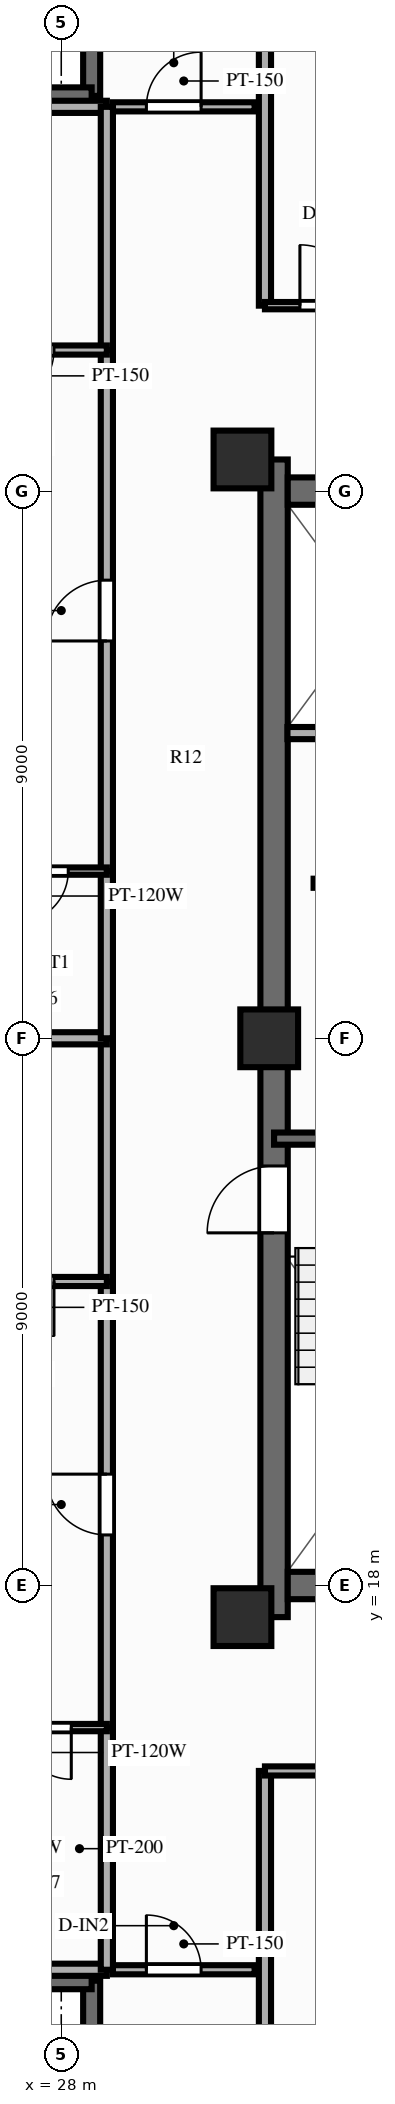
"""IFC4 building model, lengths in metres.
Left out: names, types, materials, properties, quantities, classifications, styles, units other than length and angle.
Written with IfcOpenShell. Run it as: python <this file> out.ifc"""

import sys

from ifc_helpers import new_model, si_unit, direction, frame, frame_2d, origin, origin_2d, place, context, subcontext, project, spatial, rectangle, extrude, source, transform, mapped, element, fill, save


model = new_model("IFC4")
c1 = context("Model", 3, precision=1e-05, world=origin(), true_north=direction((0.0, 1.0)))
c2 = subcontext(c1, "Body", "Model", "MODEL_VIEW")
j1 = project(units=[si_unit("LENGTHUNIT", "METRE"), si_unit("PLANEANGLEUNIT", "RADIAN")], contexts=[c1])
p1 = place(None, origin())
s1 = spatial("IfcSite", under=j1, at=p1, CompositionType="ELEMENT")
p2 = place(p1, origin())
s2 = spatial("IfcBuilding", under=s1, at=p2, CompositionType="ELEMENT")
p3 = place(p2, frame((0.0, 0.0, 240.0)))
s3 = spatial("IfcBuildingStorey", under=s2, at=p3, CompositionType="ELEMENT", Elevation=240.0)
p4 = place(p3, frame((31.5, 17.48, 0.0), z_axis=(0.0, 0.0, 1.0), x_axis=(0.0, 1.0, 0.0)))
e1 = element("IfcWall", 1, at=p4, inside=s3, PredefinedType="SHEAR", context=c2, shape_type="SweptSolid", body=[
    extrude(rectangle(XDim=19.04, YDim=0.45, at=frame_2d((9.52, 0.0))), origin(), (0.0, 0.0, 1.0), 3.0),
])
p5 = place(p4, frame((6.32, 0.0, 0.0)))
e2 = element("IfcOpeningElement", 2, at=p5, cuts=e1, PredefinedType="OPENING", context=c2, shape_type="SweptSolid", body=[
    extrude(rectangle(XDim=1.1, YDim=2.15, at=frame_2d((0.55, 1.075))), frame((0.0, 0.237, 0.0), z_axis=(0.0, -1.0, 0.0), x_axis=(1.0, 0.0, 0.0)), (0.0, 0.0, 1.0), 0.474),
])
p6 = place(p3, frame((31.725, 18.0, 0.0), z_axis=(0.0, 0.0, 1.0), x_axis=(1.0, 0.0, 0.0)))
e3 = element("IfcWall", 3, at=p6, inside=s3, PredefinedType="SHEAR", context=c2, shape_type="SweptSolid", body=[
    extrude(rectangle(XDim=12.55, YDim=0.45, at=frame_2d((6.275, 0.0))), origin(), (0.0, 0.0, 1.0), 3.0),
])
p7 = place(p3, frame((31.725, 36.0, 0.0), z_axis=(0.0, 0.0, 1.0), x_axis=(1.0, 0.0, 0.0)))
e4 = element("IfcWall", 4, at=p7, inside=s3, PredefinedType="SHEAR", context=c2, shape_type="SweptSolid", body=[
    extrude(rectangle(XDim=12.55, YDim=0.45, at=frame_2d((6.275, 0.0))), origin(), (0.0, 0.0, 1.0), 3.0),
])
p8 = place(p7, frame((5.225, 0.0, 0.0), z_axis=(0.0, 0.0, 1.0), x_axis=(-1.0, 0.0, 0.0)))
e5 = element("IfcOpeningElement", 5, at=p8, cuts=e4, PredefinedType="OPENING", context=c2, shape_type="SweptSolid", body=[
    extrude(rectangle(XDim=1.4, YDim=2.15, at=frame_2d((0.7, 1.075))), frame((0.0, 0.237, 0.0), z_axis=(0.0, -1.0, 0.0), x_axis=(1.0, 0.0, 0.0)), (0.0, 0.0, 1.0), 0.474),
])
m1 = source(origin(), c2, "Body", "SweptSolid", [
    extrude(rectangle(XDim=0.95, YDim=0.95, at=origin_2d()), origin(), (0.0, 0.0, 1.0), 3.0),
])
for number, where, z_axis, x_axis in (
    (6, (30.98, 17.48, 0.0), (0.0, 0.0, 1.0), (1.0, 0.0, 0.0)),
    (7, (30.98, 36.52, 0.0), (0.0, 0.0, 1.0), (1.0, 0.0, 0.0)),
    (8, (31.42, 27.0, 0.0), (0.0, 0.0, 1.0), (1.0, 0.0, 0.0)),
):
    element("IfcColumn", number, at=place(p3, frame(where, z_axis=z_axis, x_axis=x_axis)), inside=s3, PredefinedType="COLUMN", context=c2, shape_type="MappedRepresentation", body=[
        mapped(m1, transform((0.0, 0.0, 0.0), scale=1.0)),
    ])
for number, where, z_axis, x_axis in (
    (9, (28.5, 6.08, 0.0), (0.0, 0.0, 1.0), (0.0, 1.0, 0.0)),
    (10, (23.08, 11.5, 0.0), (0.0, 0.0, 1.0), (1.0, 0.0, 0.0)),
    (11, (28.5, 42.5, 0.0), (0.0, 0.0, 1.0), (0.0, 1.0, 0.0)),
    (12, (23.08, 42.5, 0.0), (0.0, 0.0, 1.0), (1.0, 0.0, 0.0)),
):
    element("IfcWall", number, at=place(p3, frame(where, z_axis=z_axis, x_axis=x_axis)), inside=s3, PredefinedType="SOLIDWALL", context=c2, shape_type="SweptSolid", body=[
        extrude(rectangle(XDim=5.42, YDim=0.28, at=frame_2d((2.71, 0.0))), origin(), (0.0, 0.0, 1.0), 2.28),
    ])
p9 = place(p3, frame((32.15, 29.55, 0.0), z_axis=(0.0, 0.0, 1.0), x_axis=(1.0, 0.0, 0.0)))
e13 = element("IfcWall", 13, at=p9, inside=s3, PredefinedType="PARTITIONING", context=c2, shape_type="SweptSolid", body=[
    extrude(rectangle(XDim=2.27, YDim=0.15, at=frame_2d((1.135, 0.0))), origin(), (0.0, 0.0, 1.0), 2.79),
])
p10 = place(p3, frame((31.5, 25.35, 0.0), z_axis=(0.0, 0.0, 1.0), x_axis=(1.0, 0.0, 0.0)))
e14 = element("IfcWall", 14, at=p10, inside=s3, PredefinedType="SOLIDWALL", context=c2, shape_type="SweptSolid", body=[
    extrude(rectangle(XDim=3.93, YDim=0.2, at=frame_2d((1.965, 0.0))), origin(), (0.0, 0.0, 1.0), 2.79),
])
p11 = place(p3, frame((31.72, 32.02, 0.0), z_axis=(0.0, 0.0, 1.0), x_axis=(1.0, 0.0, 0.0)))
e15 = element("IfcWall", 15, at=p11, inside=s3, PredefinedType="PARTITIONING", context=c2, shape_type="SweptSolid", body=[
    extrude(rectangle(XDim=2.8, YDim=0.2, at=frame_2d((1.4, 0.0))), origin(), (0.0, 0.0, 1.0), 2.79),
])
p12 = place(p3, frame((28.85, 11.68, 0.0), z_axis=(0.0, 0.0, 1.0), x_axis=(1.0, 0.0, 0.0)))
e16 = element("IfcWall", 16, at=p12, inside=s3, PredefinedType="PARTITIONING", context=c2, shape_type="SweptSolid", body=[
    extrude(rectangle(XDim=2.33, YDim=0.15, at=frame_2d((1.165, 0.0))), origin(), (0.0, 0.0, 1.0), 2.79),
])
p13 = place(p12, frame((0.55, 0.0, 0.0)))
e17 = element("IfcOpeningElement", 17, at=p13, cuts=e16, PredefinedType="OPENING", context=c2, shape_type="SweptSolid", body=[
    extrude(rectangle(XDim=0.9, YDim=2.1, at=frame_2d((0.45, 1.05))), frame((0.0, 0.087, 0.0), z_axis=(0.0, -1.0, 0.0), x_axis=(1.0, 0.0, 0.0)), (0.0, 0.0, 1.0), 0.174),
])
p14 = place(p3, frame((28.85, 42.32, 0.0), z_axis=(0.0, 0.0, 1.0), x_axis=(1.0, 0.0, 0.0)))
e18 = element("IfcWall", 18, at=p14, inside=s3, PredefinedType="PARTITIONING", context=c2, shape_type="SweptSolid", body=[
    extrude(rectangle(XDim=2.33, YDim=0.15, at=frame_2d((1.165, 0.0))), origin(), (0.0, 0.0, 1.0), 2.79),
])
p15 = place(p14, frame((0.55, 0.0, 0.0)))
e19 = element("IfcOpeningElement", 19, at=p15, cuts=e18, PredefinedType="OPENING", context=c2, shape_type="SweptSolid", body=[
    extrude(rectangle(XDim=0.9, YDim=2.1, at=frame_2d((0.45, 1.05))), frame((0.0, 0.087, 0.0), z_axis=(0.0, -1.0, 0.0), x_axis=(1.0, 0.0, 0.0)), (0.0, 0.0, 1.0), 0.174),
])
p16 = place(p3, frame((31.35, 14.95, 0.0), z_axis=(0.0, 0.0, 1.0), x_axis=(0.0, -1.0, 0.0)))
e20 = element("IfcWall", 20, at=p16, inside=s3, PredefinedType="PARTITIONING", context=c2, shape_type="SweptSolid", body=[
    extrude(rectangle(XDim=8.8, YDim=0.2, at=frame_2d((4.4, 0.0))), origin(), (0.0, 0.0, 1.0), 2.39),
])
p17 = place(p3, frame((31.35, 14.95, 0.0), z_axis=(0.0, 0.0, 1.0), x_axis=(1.0, 0.0, 0.0)))
e21 = element("IfcWall", 21, at=p17, inside=s3, PredefinedType="PARTITIONING", context=c2, shape_type="SweptSolid", body=[
    extrude(rectangle(XDim=6.65, YDim=0.15, at=frame_2d((3.325, 0.0))), origin(), (0.0, 0.0, 1.0), 2.79),
])
p18 = place(p17, frame((2.775, 0.0, 0.0)))
e22 = element("IfcOpeningElement", 22, at=p18, cuts=e21, PredefinedType="OPENING", context=c2, shape_type="SweptSolid", body=[
    extrude(rectangle(XDim=1.1, YDim=2.15, at=frame_2d((0.55, 1.075))), frame((0.0, 0.087, 0.0), z_axis=(0.0, -1.0, 0.0), x_axis=(1.0, 0.0, 0.0)), (0.0, 0.0, 1.0), 0.174),
])
p19 = place(p3, frame((31.35, 39.05, 0.0), z_axis=(0.0, 0.0, 1.0), x_axis=(0.0, 1.0, 0.0)))
e23 = element("IfcWall", 23, at=p19, inside=s3, PredefinedType="PARTITIONING", context=c2, shape_type="SweptSolid", body=[
    extrude(rectangle(XDim=8.8, YDim=0.2, at=frame_2d((4.4, 0.0))), origin(), (0.0, 0.0, 1.0), 2.39),
])
p20 = place(p3, frame((31.35, 39.05, 0.0), z_axis=(0.0, 0.0, 1.0), x_axis=(1.0, 0.0, 0.0)))
e24 = element("IfcWall", 24, at=p20, inside=s3, PredefinedType="PARTITIONING", context=c2, shape_type="SweptSolid", body=[
    extrude(rectangle(XDim=2.15, YDim=0.12, at=frame_2d((1.075, 0.0))), origin(), (0.0, 0.0, 1.0), 2.79),
])
p21 = place(p20, frame((0.575, 0.0, 0.0)))
e25 = element("IfcOpeningElement", 25, at=p21, cuts=e24, PredefinedType="OPENING", context=c2, shape_type="SweptSolid", body=[
    extrude(rectangle(XDim=1.0, YDim=2.1, at=frame_2d((0.5, 1.05))), frame((0.0, 0.072, 0.0), z_axis=(0.0, -1.0, 0.0), x_axis=(1.0, 0.0, 0.0)), (0.0, 0.0, 1.0), 0.144),
])
for number, where, z_axis, x_axis in (
    (26, (28.75, 11.68, 0.0), (0.0, 0.0, 1.0), (-1.0, 0.0, 0.0)),
    (27, (28.75, 42.32, 0.0), (0.0, 0.0, 1.0), (-1.0, 0.0, 0.0)),
):
    element("IfcWall", number, at=place(p3, frame(where, z_axis=z_axis, x_axis=x_axis)), inside=s3, PredefinedType="PARTITIONING", context=c2, shape_type="SweptSolid", body=[
        extrude(rectangle(XDim=5.6, YDim=0.2, at=frame_2d((2.8, 0.0))), origin(), (0.0, 0.0, 1.0), 2.79),
    ])
p22 = place(p3, frame((28.75, 11.68, 0.0), z_axis=(0.0, 0.0, 1.0), x_axis=(0.0, 1.0, 0.0)))
e28 = element("IfcWall", 28, at=p22, inside=s3, PredefinedType="PARTITIONING", context=c2, shape_type="SweptSolid", body=[
    extrude(rectangle(XDim=3.983, YDim=0.2, at=frame_2d((1.992, 0.0))), origin(), (0.0, 0.0, 1.0), 2.79),
])
p23 = place(p3, frame((28.75, 15.663, 0.0), z_axis=(0.0, 0.0, 1.0), x_axis=(0.0, 1.0, 0.0)))
e29 = element("IfcWall", 29, at=p23, inside=s3, PredefinedType="PARTITIONING", context=c2, shape_type="SweptSolid", body=[
    extrude(rectangle(XDim=7.337, YDim=0.2, at=frame_2d((3.668, 0.0))), origin(), (0.0, 0.0, 1.0), 2.79),
])
p24 = place(p23, frame((3.168, 0.0, 0.0)))
e30 = element("IfcOpeningElement", 30, at=p24, cuts=e29, PredefinedType="OPENING", context=c2, shape_type="SweptSolid", body=[
    extrude(rectangle(XDim=1.0, YDim=2.15, at=frame_2d((0.5, 1.075))), frame((0.0, 0.112, 0.0), z_axis=(0.0, -1.0, 0.0), x_axis=(1.0, 0.0, 0.0)), (0.0, 0.0, 1.0), 0.224),
])
p25 = place(p3, frame((28.75, 23.0, 0.0), z_axis=(0.0, 0.0, 1.0), x_axis=(0.0, 1.0, 0.0)))
e31 = element("IfcWall", 31, at=p25, inside=s3, PredefinedType="PARTITIONING", context=c2, shape_type="SweptSolid", body=[
    extrude(rectangle(XDim=4.0, YDim=0.2, at=frame_2d((2.0, 0.0))), origin(), (0.0, 0.0, 1.0), 2.79),
])
p26 = place(p3, frame((28.75, 15.663, 0.0), z_axis=(0.0, 0.0, 1.0), x_axis=(-1.0, 0.0, 0.0)))
e32 = element("IfcWall", 32, at=p26, inside=s3, PredefinedType="PARTITIONING", context=c2, shape_type="SweptSolid", body=[
    extrude(rectangle(XDim=2.02, YDim=0.12, at=frame_2d((1.01, 0.0))), origin(), (0.0, 0.0, 1.0), 2.79),
])
p27 = place(p26, frame((0.585, 0.0, 0.0)))
e33 = element("IfcOpeningElement", 33, at=p27, cuts=e32, PredefinedType="OPENING", context=c2, shape_type="SweptSolid", body=[
    extrude(rectangle(XDim=0.85, YDim=2.05, at=frame_2d((0.425, 1.025))), frame((0.0, 0.072, 0.0), z_axis=(0.0, -1.0, 0.0), x_axis=(1.0, 0.0, 0.0)), (0.0, 0.0, 1.0), 0.144),
])
p28 = place(p3, frame((28.75, 23.0, 0.0), z_axis=(0.0, 0.0, 1.0), x_axis=(-1.0, 0.0, 0.0)))
e34 = element("IfcWall", 34, at=p28, inside=s3, PredefinedType="PARTITIONING", context=c2, shape_type="SweptSolid", body=[
    extrude(rectangle(XDim=2.64, YDim=0.15, at=frame_2d((1.32, 0.0))), origin(), (0.0, 0.0, 1.0), 2.79),
])
p29 = place(p28, frame((0.87, 0.0, 0.0)))
e35 = element("IfcOpeningElement", 35, at=p29, cuts=e34, PredefinedType="OPENING", context=c2, shape_type="SweptSolid", body=[
    extrude(rectangle(XDim=0.9, YDim=2.1, at=frame_2d((0.45, 1.05))), frame((0.0, 0.087, 0.0), z_axis=(0.0, -1.0, 0.0), x_axis=(1.0, 0.0, 0.0)), (0.0, 0.0, 1.0), 0.174),
])
p30 = place(p3, frame((28.75, 27.0, 0.0), z_axis=(0.0, 0.0, 1.0), x_axis=(-1.0, 0.0, 0.0)))
e36 = element("IfcWall", 36, at=p30, inside=s3, PredefinedType="PARTITIONING", context=c2, shape_type="SweptSolid", body=[
    extrude(rectangle(XDim=5.6, YDim=0.2, at=frame_2d((2.8, 0.0))), origin(), (0.0, 0.0, 1.0), 2.79),
])
p31 = place(p3, frame((28.75, 27.0, 0.0), z_axis=(0.0, 0.0, 1.0), x_axis=(0.0, 1.0, 0.0)))
e37 = element("IfcWall", 37, at=p31, inside=s3, PredefinedType="PARTITIONING", context=c2, shape_type="SweptSolid", body=[
    extrude(rectangle(XDim=2.75, YDim=0.2, at=frame_2d((1.375, 0.0))), origin(), (0.0, 0.0, 1.0), 2.79),
])
p32 = place(p3, frame((28.75, 29.75, 0.0), z_axis=(0.0, 0.0, 1.0), x_axis=(0.0, 1.0, 0.0)))
e38 = element("IfcWall", 38, at=p32, inside=s3, PredefinedType="PARTITIONING", context=c2, shape_type="SweptSolid", body=[
    extrude(rectangle(XDim=8.57, YDim=0.2, at=frame_2d((4.285, 0.0))), origin(), (0.0, 0.0, 1.0), 2.79),
])
p33 = place(p32, frame((3.785, 0.0, 0.0)))
e39 = element("IfcOpeningElement", 39, at=p33, cuts=e38, PredefinedType="OPENING", context=c2, shape_type="SweptSolid", body=[
    extrude(rectangle(XDim=1.0, YDim=2.15, at=frame_2d((0.5, 1.075))), frame((0.0, 0.112, 0.0), z_axis=(0.0, -1.0, 0.0), x_axis=(1.0, 0.0, 0.0)), (0.0, 0.0, 1.0), 0.224),
])
p34 = place(p3, frame((28.75, 38.32, 0.0), z_axis=(0.0, 0.0, 1.0), x_axis=(0.0, 1.0, 0.0)))
e40 = element("IfcWall", 40, at=p34, inside=s3, PredefinedType="PARTITIONING", context=c2, shape_type="SweptSolid", body=[
    extrude(rectangle(XDim=4.0, YDim=0.2, at=frame_2d((2.0, 0.0))), origin(), (0.0, 0.0, 1.0), 2.79),
])
p35 = place(p3, frame((28.75, 29.75, 0.0), z_axis=(0.0, 0.0, 1.0), x_axis=(-1.0, 0.0, 0.0)))
e41 = element("IfcWall", 41, at=p35, inside=s3, PredefinedType="PARTITIONING", context=c2, shape_type="SweptSolid", body=[
    extrude(rectangle(XDim=2.12, YDim=0.12, at=frame_2d((1.06, 0.0))), origin(), (0.0, 0.0, 1.0), 2.79),
])
p36 = place(p35, frame((0.635, 0.0, 0.0)))
e42 = element("IfcOpeningElement", 42, at=p36, cuts=e41, PredefinedType="OPENING", context=c2, shape_type="SweptSolid", body=[
    extrude(rectangle(XDim=0.85, YDim=2.05, at=frame_2d((0.425, 1.025))), frame((0.0, 0.072, 0.0), z_axis=(0.0, -1.0, 0.0), x_axis=(1.0, 0.0, 0.0)), (0.0, 0.0, 1.0), 0.144),
])
p37 = place(p3, frame((28.75, 38.32, 0.0), z_axis=(0.0, 0.0, 1.0), x_axis=(-1.0, 0.0, 0.0)))
e43 = element("IfcWall", 43, at=p37, inside=s3, PredefinedType="PARTITIONING", context=c2, shape_type="SweptSolid", body=[
    extrude(rectangle(XDim=2.64, YDim=0.15, at=frame_2d((1.32, 0.0))), origin(), (0.0, 0.0, 1.0), 2.79),
])
p38 = place(p37, frame((0.87, 0.0, 0.0)))
e44 = element("IfcOpeningElement", 44, at=p38, cuts=e43, PredefinedType="OPENING", context=c2, shape_type="SweptSolid", body=[
    extrude(rectangle(XDim=0.9, YDim=2.1, at=frame_2d((0.45, 1.05))), frame((0.0, 0.087, 0.0), z_axis=(0.0, -1.0, 0.0), x_axis=(1.0, 0.0, 0.0)), (0.0, 0.0, 1.0), 0.174),
])
m2 = source(origin(), c2, "Body", "SweptSolid", [
    extrude(rectangle(XDim=1.1, YDim=2.15, at=frame_2d((0.55, 1.075))), frame((0.0, 0.025, 0.0), z_axis=(0.0, -1.0, 0.0), x_axis=(1.0, 0.0, 0.0)), (0.0, 0.0, 1.0), 0.05),
])
p39 = place(p5, origin())
e45 = element("IfcDoor", 45, at=p39, inside=s3, OperationType="SINGLE_SWING_LEFT", PredefinedType="DOOR", context=c2, shape_type="MappedRepresentation", body=[
    mapped(m2, transform((0.0, 0.0, 0.0), scale=1.0)),
])
fill(e2, e45)
m3 = source(origin(), c2, "Body", "SweptSolid", [
    extrude(rectangle(XDim=0.9, YDim=2.1, at=frame_2d((0.45, 1.05))), frame((0.0, 0.025, 0.0), z_axis=(0.0, -1.0, 0.0), x_axis=(1.0, 0.0, 0.0)), (0.0, 0.0, 1.0), 0.05),
])
p40 = place(p13, origin())
e46 = element("IfcDoor", 46, at=p40, inside=s3, OperationType="SINGLE_SWING_LEFT", PredefinedType="DOOR", context=c2, shape_type="MappedRepresentation", body=[
    mapped(m3, transform((0.0, 0.0, 0.0), scale=1.0)),
])
fill(e17, e46)
p41 = place(p15, origin())
e47 = element("IfcDoor", 47, at=p41, inside=s3, OperationType="SINGLE_SWING_RIGHT", PredefinedType="DOOR", context=c2, shape_type="MappedRepresentation", body=[
    mapped(m3, transform((0.0, 0.0, 0.0), scale=1.0)),
])
fill(e19, e47)
m4 = source(origin(), c2, "Body", "SweptSolid", [
    extrude(rectangle(XDim=1.0, YDim=2.1, at=frame_2d((0.5, 1.05))), frame((0.0, 0.025, 0.0), z_axis=(0.0, -1.0, 0.0), x_axis=(1.0, 0.0, 0.0)), (0.0, 0.0, 1.0), 0.05),
])
p42 = place(p21, origin())
e48 = element("IfcDoor", 48, at=p42, inside=s3, OperationType="SINGLE_SWING_LEFT", PredefinedType="DOOR", context=c2, shape_type="MappedRepresentation", body=[
    mapped(m4, transform((0.0, 0.0, 0.0), scale=1.0)),
])
fill(e25, e48)
m5 = source(origin(), c2, "Body", "SweptSolid", [
    extrude(rectangle(XDim=1.0, YDim=2.15, at=frame_2d((0.5, 1.075))), frame((0.0, 0.025, 0.0), z_axis=(0.0, -1.0, 0.0), x_axis=(1.0, 0.0, 0.0)), (0.0, 0.0, 1.0), 0.05),
])
p43 = place(p24, origin())
e49 = element("IfcDoor", 49, at=p43, inside=s3, OperationType="SINGLE_SWING_RIGHT", PredefinedType="DOOR", context=c2, shape_type="MappedRepresentation", body=[
    mapped(m5, transform((0.0, 0.0, 0.0), scale=1.0)),
])
fill(e30, e49)
m6 = source(origin(), c2, "Body", "SweptSolid", [
    extrude(rectangle(XDim=0.85, YDim=2.05, at=frame_2d((0.425, 1.025))), frame((0.0, 0.025, 0.0), z_axis=(0.0, -1.0, 0.0), x_axis=(1.0, 0.0, 0.0)), (0.0, 0.0, 1.0), 0.05),
])
p44 = place(p27, origin())
e50 = element("IfcDoor", 50, at=p44, inside=s3, OperationType="SINGLE_SWING_LEFT", PredefinedType="DOOR", context=c2, shape_type="MappedRepresentation", body=[
    mapped(m6, transform((0.0, 0.0, 0.0), scale=1.0)),
])
fill(e33, e50)
p45 = place(p29, origin())
e51 = element("IfcDoor", 51, at=p45, inside=s3, OperationType="SINGLE_SWING_LEFT", PredefinedType="DOOR", context=c2, shape_type="MappedRepresentation", body=[
    mapped(m3, transform((0.0, 0.0, 0.0), scale=1.0)),
])
fill(e35, e51)
p46 = place(p33, origin())
e52 = element("IfcDoor", 52, at=p46, inside=s3, OperationType="SINGLE_SWING_LEFT", PredefinedType="DOOR", context=c2, shape_type="MappedRepresentation", body=[
    mapped(m5, transform((0.0, 0.0, 0.0), scale=1.0)),
])
fill(e39, e52)
p47 = place(p36, origin())
e53 = element("IfcDoor", 53, at=p47, inside=s3, OperationType="SINGLE_SWING_RIGHT", PredefinedType="DOOR", context=c2, shape_type="MappedRepresentation", body=[
    mapped(m6, transform((0.0, 0.0, 0.0), scale=1.0)),
])
fill(e42, e53)
p48 = place(p38, origin())
e54 = element("IfcDoor", 54, at=p48, inside=s3, OperationType="SINGLE_SWING_RIGHT", PredefinedType="DOOR", context=c2, shape_type="MappedRepresentation", body=[
    mapped(m3, transform((0.0, 0.0, 0.0), scale=1.0)),
])
fill(e44, e54)
save(model, sys.argv[1])
